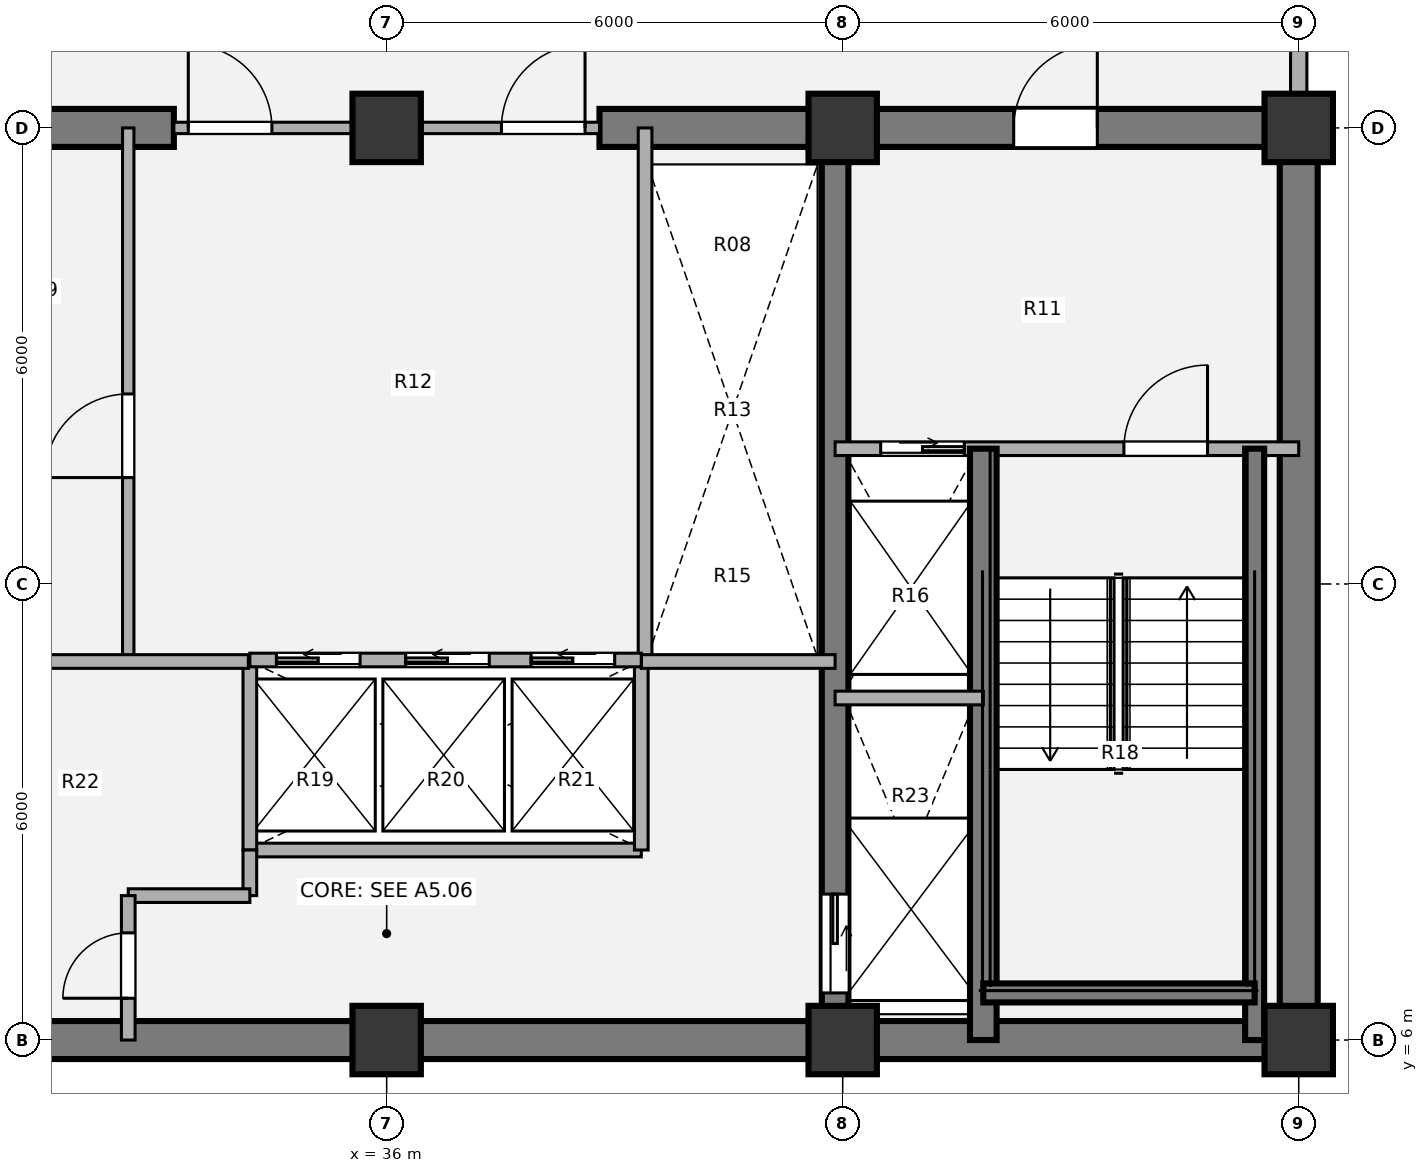
"""IFC4 building model, lengths in metres.
Left out: names, types, materials, properties, quantities, classifications, styles, units other than length and angle.
Written with IfcOpenShell. Run it as: python <this file> out.ifc"""

import sys

from ifc_helpers import new_model, si_unit, direction, frame, frame_2d, origin, origin_2d, place, context, subcontext, project, spatial, rectangle, extrude, source, transform, mapped, element, fill, save


model = new_model("IFC4")
c1 = context("Model", 3, precision=1e-05, world=origin(), true_north=direction((0.0, 1.0)))
c2 = subcontext(c1, "Body", "Model", "MODEL_VIEW")
j1 = project(units=[si_unit("LENGTHUNIT", "METRE"), si_unit("PLANEANGLEUNIT", "RADIAN")], contexts=[c1])
p1 = place(None, origin())
s1 = spatial("IfcSite", under=j1, at=p1, CompositionType="ELEMENT")
p2 = place(p1, origin())
s2 = spatial("IfcBuilding", under=s1, at=p2, CompositionType="ELEMENT")
p3 = place(p2, frame((0.0, 0.0, 123.84)))
s3 = spatial("IfcBuildingStorey", under=s2, at=p3, CompositionType="ELEMENT", Elevation=123.84)
m1 = source(origin(), c2, "Body", "SweptSolid", [
    extrude(rectangle(XDim=0.9, YDim=0.9, at=origin_2d()), origin(), (0.0, 0.0, 1.0), 3.78),
])
for number, where, z_axis, x_axis in (
    (1, (36.0, 6.0, 0.0), (0.0, 0.0, 1.0), (1.0, 0.0, 0.0)),
    (2, (42.0, 6.0, 0.0), (0.0, 0.0, 1.0), (1.0, 0.0, 0.0)),
    (3, (48.0, 6.0, 0.0), (0.0, 0.0, 1.0), (1.0, 0.0, 0.0)),
    (4, (36.0, 18.0, 0.0), (0.0, 0.0, 1.0), (1.0, 0.0, 0.0)),
    (5, (42.0, 18.0, 0.0), (0.0, 0.0, 1.0), (1.0, 0.0, 0.0)),
    (6, (48.0, 18.0, 0.0), (0.0, 0.0, 1.0), (1.0, 0.0, 0.0)),
):
    element("IfcColumn", number, at=place(p3, frame(where, z_axis=z_axis, x_axis=x_axis)), inside=s3, PredefinedType="COLUMN", context=c2, shape_type="MappedRepresentation", body=[
        mapped(m1, transform((0.0, 0.0, 0.0), x_axis=(1.0, 0.0, 0.0), y_axis=(0.0, 1.0, 0.0), z_axis=(0.0, 0.0, 1.0), scale=1.0)),
    ])
p4 = place(p3, frame((48.25, 6.0, 0.0), z_axis=(0.0, 0.0, 1.0), x_axis=(-1.0, 0.0, 0.0)))
e7 = element("IfcWall", 7, at=p4, inside=s3, PredefinedType="SHEAR", context=c2, shape_type="SweptSolid", body=[
    extrude(rectangle(XDim=24.5, YDim=0.5, at=frame_2d((12.25, 0.0))), origin(), (0.0, 0.0, 1.0), 3.78),
])
p5 = place(p3, frame((48.0, 18.0, 0.0), z_axis=(0.0, 0.0, 1.0), x_axis=(0.0, -1.0, 0.0)))
e8 = element("IfcWall", 8, at=p5, inside=s3, PredefinedType="SHEAR", context=c2, shape_type="SweptSolid", body=[
    extrude(rectangle(XDim=12.0, YDim=0.5, at=frame_2d((6.0, 0.0))), origin(), (0.0, 0.0, 1.0), 3.78),
])
p6 = place(p3, frame((23.75, 18.0, 0.0), z_axis=(0.0, 0.0, 1.0), x_axis=(1.0, 0.0, 0.0)))
e9 = element("IfcWall", 9, at=p6, inside=s3, PredefinedType="SHEAR", context=c2, shape_type="SweptSolid", body=[
    extrude(rectangle(XDim=9.45, YDim=0.5, at=frame_2d((4.725, 0.0))), origin(), (0.0, 0.0, 1.0), 3.78),
])
p7 = place(p6, frame((2.95, 0.0, 0.0)))
e10 = element("IfcOpeningElement", 10, at=p7, cuts=e9, PredefinedType="OPENING", context=c2, shape_type="SweptSolid", body=[
    extrude(rectangle(XDim=1.1, YDim=2.1, at=origin_2d()), frame((0.55, 0.26, 1.05), z_axis=(0.0, -1.0, 0.0), x_axis=(1.0, 0.0, 0.0)), (0.0, 0.0, 1.0), 0.52),
])
p8 = place(p3, frame((38.8, 18.0, 0.0), z_axis=(0.0, 0.0, 1.0), x_axis=(1.0, 0.0, 0.0)))
e11 = element("IfcWall", 11, at=p8, inside=s3, PredefinedType="SHEAR", context=c2, shape_type="SweptSolid", body=[
    extrude(rectangle(XDim=9.45, YDim=0.5, at=frame_2d((4.725, 0.0))), origin(), (0.0, 0.0, 1.0), 3.78),
])
p9 = place(p8, frame((5.45, 0.0, 0.0)))
e12 = element("IfcOpeningElement", 12, at=p9, cuts=e11, PredefinedType="OPENING", context=c2, shape_type="SweptSolid", body=[
    extrude(rectangle(XDim=1.1, YDim=2.1, at=origin_2d()), frame((0.55, 0.26, 1.05), z_axis=(0.0, -1.0, 0.0), x_axis=(1.0, 0.0, 0.0)), (0.0, 0.0, 1.0), 0.52),
])
p10 = place(p3, frame((41.9, 18.0, 0.0), z_axis=(0.0, 0.0, 1.0), x_axis=(0.0, -1.0, 0.0)))
e13 = element("IfcWall", 13, at=p10, inside=s3, PredefinedType="SHEAR", context=c2, shape_type="SweptSolid", body=[
    extrude(rectangle(XDim=12.0, YDim=0.35, at=frame_2d((6.0, 0.0))), origin(), (0.0, 0.0, 1.0), 3.78),
])
p11 = place(p10, frame((10.08, 0.0, 0.0)))
e14 = element("IfcOpeningElement", 14, at=p11, cuts=e13, PredefinedType="OPENING", context=c2, shape_type="SweptSolid", body=[
    extrude(rectangle(XDim=1.3, YDim=2.1, at=origin_2d()), frame((0.65, 0.185, 1.05), z_axis=(0.0, -1.0, 0.0), x_axis=(1.0, 0.0, 0.0)), (0.0, 0.0, 1.0), 0.37),
])
p12 = place(p3, frame((48.0, 21.05, 0.0), z_axis=(0.0, 0.0, 1.0), x_axis=(0.0, -1.0, 0.0)))
e15 = element("IfcWall", 15, at=p12, inside=s3, PredefinedType="SOLIDWALL", context=c2, shape_type="SweptSolid", body=[
    extrude(rectangle(XDim=2.62, YDim=0.215, at=frame_2d((1.31, 0.0))), origin(), (0.0, 0.0, 1.0), 3.53),
])
p13 = place(p3, frame((32.6, 11.0, 0.0), z_axis=(0.0, 0.0, 1.0), x_axis=(0.0, 1.0, 0.0)))
e16 = element("IfcWall", 16, at=p13, inside=s3, PredefinedType="PARTITIONING", context=c2, shape_type="SweptSolid", body=[
    extrude(rectangle(XDim=7.0, YDim=0.15, at=frame_2d((3.5, 0.0))), origin(), (0.0, 0.0, 1.0), 3.5),
])
p14 = place(p13, frame((2.4, 0.0, 0.0)))
e17 = element("IfcOpeningElement", 17, at=p14, cuts=e16, PredefinedType="OPENING", context=c2, shape_type="SweptSolid", body=[
    extrude(rectangle(XDim=1.1, YDim=2.1, at=origin_2d()), frame((0.55, 0.085, 1.05), z_axis=(0.0, -1.0, 0.0), x_axis=(1.0, 0.0, 0.0)), (0.0, 0.0, 1.0), 0.17),
])
p15 = place(p3, frame((34.2, 8.5, 0.0), z_axis=(0.0, 0.0, 1.0), x_axis=(1.0, 0.0, 0.0)))
e18 = element("IfcWall", 18, at=p15, inside=s3, PredefinedType="PARTITIONING", context=c2, shape_type="SweptSolid", body=[
    extrude(rectangle(XDim=5.15, YDim=0.18, at=frame_2d((2.575, 0.0))), origin(), (0.0, 0.0, 1.0), 3.5),
])
for number, where, z_axis, x_axis in (
    (19, (34.2, 8.5, 0.0), (0.0, 0.0, 1.0), (0.0, 1.0, 0.0)),
    (20, (39.35, 8.5, 0.0), (0.0, 0.0, 1.0), (0.0, 1.0, 0.0)),
):
    element("IfcWall", number, at=place(p3, frame(where, z_axis=z_axis, x_axis=x_axis)), inside=s3, PredefinedType="PARTITIONING", context=c2, shape_type="SweptSolid", body=[
        extrude(rectangle(XDim=2.5, YDim=0.18, at=frame_2d((1.25, 0.0))), origin(), (0.0, 0.0, 1.0), 3.5),
    ])
p16 = place(p3, frame((39.4, 11.0, 0.0), z_axis=(0.0, 0.0, 1.0), x_axis=(0.0, 1.0, 0.0)))
e21 = element("IfcWall", 21, at=p16, inside=s3, PredefinedType="PARTITIONING", context=c2, shape_type="SweptSolid", body=[
    extrude(rectangle(XDim=7.0, YDim=0.18, at=frame_2d((3.5, 0.0))), origin(), (0.0, 0.0, 1.0), 3.5),
])
p17 = place(p3, frame((30.1, 10.98, 0.0), z_axis=(0.0, 0.0, 1.0), x_axis=(1.0, 0.0, 0.0)))
e22 = element("IfcWall", 22, at=p17, inside=s3, PredefinedType="PARTITIONING", context=c2, shape_type="SweptSolid", body=[
    extrude(rectangle(XDim=4.08, YDim=0.18, at=frame_2d((2.04, 0.0))), origin(), (0.0, 0.0, 1.0), 3.5),
])
p18 = place(p3, frame((34.2, 7.9, 0.0), z_axis=(0.0, 0.0, 1.0), x_axis=(0.0, 1.0, 0.0)))
e23 = element("IfcWall", 23, at=p18, inside=s3, PredefinedType="PARTITIONING", context=c2, shape_type="SweptSolid", body=[
    extrude(rectangle(XDim=0.6, YDim=0.18, at=frame_2d((0.3, 0.0))), origin(), (0.0, 0.0, 1.0), 3.5),
])
p19 = place(p3, frame((32.6, 7.9, 0.0), z_axis=(0.0, 0.0, 1.0), x_axis=(1.0, 0.0, 0.0)))
e24 = element("IfcWall", 24, at=p19, inside=s3, PredefinedType="PARTITIONING", context=c2, shape_type="SweptSolid", body=[
    extrude(rectangle(XDim=1.6, YDim=0.18, at=frame_2d((0.8, 0.0))), origin(), (0.0, 0.0, 1.0), 3.5),
])
p20 = place(p3, frame((32.6, 6.0, 0.0), z_axis=(0.0, 0.0, 1.0), x_axis=(0.0, 1.0, 0.0)))
e25 = element("IfcWall", 25, at=p20, inside=s3, PredefinedType="PARTITIONING", context=c2, shape_type="SweptSolid", body=[
    extrude(rectangle(XDim=1.9, YDim=0.18, at=frame_2d((0.95, 0.0))), origin(), (0.0, 0.0, 1.0), 3.5),
])
p21 = place(p20, frame((0.55, 0.0, 0.0)))
e26 = element("IfcOpeningElement", 26, at=p21, cuts=e25, PredefinedType="OPENING", context=c2, shape_type="SweptSolid", body=[
    extrude(rectangle(XDim=0.86, YDim=2.1, at=origin_2d()), frame((0.43, 0.1, 1.05), z_axis=(0.0, -1.0, 0.0), x_axis=(1.0, 0.0, 0.0)), (0.0, 0.0, 1.0), 0.2),
])
p22 = place(p3, frame((39.35, 10.98, 0.0), z_axis=(0.0, 0.0, 1.0), x_axis=(1.0, 0.0, 0.0)))
e27 = element("IfcWall", 27, at=p22, inside=s3, PredefinedType="PARTITIONING", context=c2, shape_type="SweptSolid", body=[
    extrude(rectangle(XDim=2.55, YDim=0.18, at=frame_2d((1.275, 0.0))), origin(), (0.0, 0.0, 1.0), 3.5),
])
p23 = place(p3, frame((33.2, 18.0, 0.0), z_axis=(0.0, 0.0, 1.0), x_axis=(1.0, 0.0, 0.0)))
e28 = element("IfcWall", 28, at=p23, inside=s3, PredefinedType="PARTITIONING", context=c2, shape_type="SweptSolid", body=[
    extrude(rectangle(XDim=5.6, YDim=0.15, at=frame_2d((2.8, 0.0))), origin(), (0.0, 0.0, 1.0), 2.315),
])
p24 = place(p23, frame((0.19, 0.0, 0.0)))
e29 = element("IfcOpeningElement", 29, at=p24, cuts=e28, PredefinedType="OPENING", context=c2, shape_type="SweptSolid", body=[
    extrude(rectangle(XDim=1.1, YDim=2.1, at=origin_2d()), frame((0.55, 0.085, 1.05), z_axis=(0.0, -1.0, 0.0), x_axis=(1.0, 0.0, 0.0)), (0.0, 0.0, 1.0), 0.17),
])
p25 = place(p23, frame((4.31, 0.0, 0.0)))
e30 = element("IfcOpeningElement", 30, at=p25, cuts=e28, PredefinedType="OPENING", context=c2, shape_type="SweptSolid", body=[
    extrude(rectangle(XDim=1.1, YDim=2.1, at=origin_2d()), frame((0.55, 0.085, 1.05), z_axis=(0.0, -1.0, 0.0), x_axis=(1.0, 0.0, 0.0)), (0.0, 0.0, 1.0), 0.17),
])
p26 = place(p3, frame((41.9, 13.78, 0.0), z_axis=(0.0, 0.0, 1.0), x_axis=(1.0, 0.0, 0.0)))
e31 = element("IfcWall", 31, at=p26, inside=s3, PredefinedType="PARTITIONING", context=c2, shape_type="SweptSolid", body=[
    extrude(rectangle(XDim=6.1, YDim=0.18, at=frame_2d((3.05, 0.0))), origin(), (0.0, 0.0, 1.0), 3.5),
])
p27 = place(p26, frame((0.6, 0.0, 0.0)))
e32 = element("IfcOpeningElement", 32, at=p27, cuts=e31, PredefinedType="OPENING", context=c2, shape_type="SweptSolid", body=[
    extrude(rectangle(XDim=1.1, YDim=2.1, at=origin_2d()), frame((0.55, 0.1, 1.05), z_axis=(0.0, -1.0, 0.0), x_axis=(1.0, 0.0, 0.0)), (0.0, 0.0, 1.0), 0.2),
])
p28 = place(p26, frame((3.8, 0.0, 0.0)))
e33 = element("IfcOpeningElement", 33, at=p28, cuts=e31, PredefinedType="OPENING", context=c2, shape_type="SweptSolid", body=[
    extrude(rectangle(XDim=1.1, YDim=2.1, at=origin_2d()), frame((0.55, 0.1, 1.05), z_axis=(0.0, -1.0, 0.0), x_axis=(1.0, 0.0, 0.0)), (0.0, 0.0, 1.0), 0.2),
])
p29 = place(p3, frame((43.85, 6.0, 0.0), z_axis=(0.0, 0.0, 1.0), x_axis=(0.0, 1.0, 0.0)))
e34 = element("IfcWall", 34, at=p29, inside=s3, PredefinedType="SHEAR", context=c2, shape_type="SweptSolid", body=[
    extrude(rectangle(XDim=7.78, YDim=0.35, at=frame_2d((3.89, 0.0))), origin(), (0.0, 0.0, 1.0), 3.85),
])
p30 = place(p3, frame((47.42, 6.0, 0.0), z_axis=(0.0, 0.0, 1.0), x_axis=(0.0, 1.0, 0.0)))
e35 = element("IfcWall", 35, at=p30, inside=s3, PredefinedType="SHEAR", context=c2, shape_type="SweptSolid", body=[
    extrude(rectangle(XDim=7.78, YDim=0.25, at=frame_2d((3.89, 0.0))), origin(), (0.0, 0.0, 1.0), 3.85),
])
p31 = place(p3, frame((43.85, 6.62, 0.0), z_axis=(0.0, 0.0, 1.0), x_axis=(1.0, 0.0, 0.0)))
e36 = element("IfcWall", 36, at=p31, inside=s3, PredefinedType="SHEAR", context=c2, shape_type="SweptSolid", body=[
    extrude(rectangle(XDim=3.57, YDim=0.25, at=frame_2d((1.785, 0.0))), origin(), (0.0, 0.0, 1.0), 3.85),
])
p32 = place(p3, frame((41.9, 10.5, 0.0), z_axis=(0.0, 0.0, 1.0), x_axis=(1.0, 0.0, 0.0)))
e37 = element("IfcWall", 37, at=p32, inside=s3, PredefinedType="PARTITIONING", context=c2, shape_type="SweptSolid", body=[
    extrude(rectangle(XDim=1.95, YDim=0.18, at=frame_2d((0.975, 0.0))), origin(), (0.0, 0.0, 1.0), 3.5),
])
p33 = place(p3, frame((34.2, 11.0, 0.0), z_axis=(0.0, 0.0, 1.0), x_axis=(1.0, 0.0, 0.0)))
e38 = element("IfcWall", 38, at=p33, inside=s3, PredefinedType="PARTITIONING", context=c2, shape_type="SweptSolid", body=[
    extrude(rectangle(XDim=5.15, YDim=0.18, at=frame_2d((2.575, 0.0))), origin(), (0.0, 0.0, 1.0), 3.5),
])
p34 = place(p33, frame((0.35, 0.0, 0.0)))
e39 = element("IfcOpeningElement", 39, at=p34, cuts=e38, PredefinedType="OPENING", context=c2, shape_type="SweptSolid", body=[
    extrude(rectangle(XDim=1.1, YDim=2.1, at=origin_2d()), frame((0.55, 0.1, 1.05), z_axis=(0.0, -1.0, 0.0), x_axis=(1.0, 0.0, 0.0)), (0.0, 0.0, 1.0), 0.2),
])
p35 = place(p33, frame((2.05, 0.0, 0.0)))
e40 = element("IfcOpeningElement", 40, at=p35, cuts=e38, PredefinedType="OPENING", context=c2, shape_type="SweptSolid", body=[
    extrude(rectangle(XDim=1.1, YDim=2.1, at=origin_2d()), frame((0.55, 0.1, 1.05), z_axis=(0.0, -1.0, 0.0), x_axis=(1.0, 0.0, 0.0)), (0.0, 0.0, 1.0), 0.2),
])
p36 = place(p33, frame((3.7, 0.0, 0.0)))
e41 = element("IfcOpeningElement", 41, at=p36, cuts=e38, PredefinedType="OPENING", context=c2, shape_type="SweptSolid", body=[
    extrude(rectangle(XDim=1.1, YDim=2.1, at=origin_2d()), frame((0.55, 0.1, 1.05), z_axis=(0.0, -1.0, 0.0), x_axis=(1.0, 0.0, 0.0)), (0.0, 0.0, 1.0), 0.2),
])
m2 = source(origin(), c2, "Body", "SweptSolid", [
    extrude(rectangle(XDim=1.1, YDim=2.1, at=origin_2d()), frame((0.55, 0.025, 1.05), z_axis=(0.0, -1.0, 0.0), x_axis=(1.0, 0.0, 0.0)), (0.0, 0.0, 1.0), 0.05),
])
p37 = place(p14, origin())
e42 = element("IfcDoor", 42, at=p37, inside=s3, OperationType="SINGLE_SWING_LEFT", PredefinedType="DOOR", context=c2, shape_type="MappedRepresentation", body=[
    mapped(m2, transform((0.0, 0.0, 0.0), x_axis=(1.0, 0.0, 0.0), y_axis=(0.0, 1.0, 0.0), z_axis=(0.0, 0.0, 1.0), scale=1.0)),
])
fill(e17, e42)
m3 = source(origin(), c2, "Body", "SweptSolid", [
    extrude(rectangle(XDim=0.86, YDim=2.1, at=origin_2d()), frame((0.43, 0.025, 1.05), z_axis=(0.0, -1.0, 0.0), x_axis=(1.0, 0.0, 0.0)), (0.0, 0.0, 1.0), 0.05),
])
p38 = place(p21, origin())
e43 = element("IfcDoor", 43, at=p38, inside=s3, OperationType="SINGLE_SWING_LEFT", PredefinedType="DOOR", context=c2, shape_type="MappedRepresentation", body=[
    mapped(m3, transform((0.0, 0.0, 0.0), x_axis=(1.0, 0.0, 0.0), y_axis=(0.0, 1.0, 0.0), z_axis=(0.0, 0.0, 1.0), scale=1.0)),
])
fill(e26, e43)
m4 = source(origin(), c2, "Body", "SweptSolid", [
    extrude(rectangle(XDim=1.1, YDim=2.1, at=origin_2d()), frame((0.55, 0.025, 1.05), z_axis=(0.0, -1.0, 0.0), x_axis=(1.0, 0.0, 0.0)), (0.0, 0.0, 1.0), 0.05),
])
p39 = place(p24, origin())
e44 = element("IfcDoor", 44, at=p39, inside=s3, OperationType="SINGLE_SWING_LEFT", PredefinedType="DOOR", context=c2, shape_type="MappedRepresentation", body=[
    mapped(m4, transform((0.0, 0.0, 0.0), x_axis=(1.0, 0.0, 0.0), y_axis=(0.0, 1.0, 0.0), z_axis=(0.0, 0.0, 1.0), scale=1.0)),
])
fill(e29, e44)
p40 = place(p25, origin())
e45 = element("IfcDoor", 45, at=p40, inside=s3, OperationType="SINGLE_SWING_RIGHT", PredefinedType="DOOR", context=c2, shape_type="MappedRepresentation", body=[
    mapped(m4, transform((0.0, 0.0, 0.0), x_axis=(1.0, 0.0, 0.0), y_axis=(0.0, 1.0, 0.0), z_axis=(0.0, 0.0, 1.0), scale=1.0)),
])
fill(e30, e45)
m5 = source(origin(), c2, "Body", "SweptSolid", [
    extrude(rectangle(XDim=1.1, YDim=2.1, at=origin_2d()), frame((0.55, 0.025, 1.05), z_axis=(0.0, -1.0, 0.0), x_axis=(1.0, 0.0, 0.0)), (0.0, 0.0, 1.0), 0.05),
])
p41 = place(p27, origin())
e46 = element("IfcDoor", 46, at=p41, inside=s3, OperationType="SLIDING_TO_RIGHT", PredefinedType="DOOR", context=c2, shape_type="MappedRepresentation", body=[
    mapped(m5, transform((0.0, 0.0, 0.0), x_axis=(1.0, 0.0, 0.0), y_axis=(0.0, 1.0, 0.0), z_axis=(0.0, 0.0, 1.0), scale=1.0)),
])
fill(e32, e46)
m6 = source(origin(), c2, "Body", "SweptSolid", [
    extrude(rectangle(XDim=1.1, YDim=2.1, at=origin_2d()), frame((0.55, 0.025, 1.05), z_axis=(0.0, -1.0, 0.0), x_axis=(1.0, 0.0, 0.0)), (0.0, 0.0, 1.0), 0.05),
])
p42 = place(p28, origin())
e47 = element("IfcDoor", 47, at=p42, inside=s3, OperationType="SINGLE_SWING_RIGHT", PredefinedType="DOOR", context=c2, shape_type="MappedRepresentation", body=[
    mapped(m6, transform((0.0, 0.0, 0.0), x_axis=(1.0, 0.0, 0.0), y_axis=(0.0, 1.0, 0.0), z_axis=(0.0, 0.0, 1.0), scale=1.0)),
])
fill(e33, e47)
m7 = source(origin(), c2, "Body", "SweptSolid", [
    extrude(rectangle(XDim=1.3, YDim=2.1, at=origin_2d()), frame((0.65, 0.025, 1.05), z_axis=(0.0, -1.0, 0.0), x_axis=(1.0, 0.0, 0.0)), (0.0, 0.0, 1.0), 0.05),
])
p43 = place(p11, origin())
e48 = element("IfcDoor", 48, at=p43, inside=s3, OperationType="SLIDING_TO_LEFT", PredefinedType="DOOR", context=c2, shape_type="MappedRepresentation", body=[
    mapped(m7, transform((0.0, 0.0, 0.0), x_axis=(1.0, 0.0, 0.0), y_axis=(0.0, 1.0, 0.0), z_axis=(0.0, 0.0, 1.0), scale=1.0)),
])
fill(e14, e48)
p44 = place(p9, origin())
e49 = element("IfcDoor", 49, at=p44, inside=s3, OperationType="SINGLE_SWING_RIGHT", PredefinedType="DOOR", context=c2, shape_type="MappedRepresentation", body=[
    mapped(m4, transform((0.0, 0.0, 0.0), x_axis=(1.0, 0.0, 0.0), y_axis=(0.0, 1.0, 0.0), z_axis=(0.0, 0.0, 1.0), scale=1.0)),
])
fill(e12, e49)
p45 = place(p34, origin())
e50 = element("IfcDoor", 50, at=p45, inside=s3, OperationType="SLIDING_TO_LEFT", PredefinedType="DOOR", context=c2, shape_type="MappedRepresentation", body=[
    mapped(m5, transform((0.0, 0.0, 0.0), x_axis=(1.0, 0.0, 0.0), y_axis=(0.0, 1.0, 0.0), z_axis=(0.0, 0.0, 1.0), scale=1.0)),
])
fill(e39, e50)
p46 = place(p35, origin())
e51 = element("IfcDoor", 51, at=p46, inside=s3, OperationType="SLIDING_TO_LEFT", PredefinedType="DOOR", context=c2, shape_type="MappedRepresentation", body=[
    mapped(m5, transform((0.0, 0.0, 0.0), x_axis=(1.0, 0.0, 0.0), y_axis=(0.0, 1.0, 0.0), z_axis=(0.0, 0.0, 1.0), scale=1.0)),
])
fill(e40, e51)
p47 = place(p36, origin())
e52 = element("IfcDoor", 52, at=p47, inside=s3, OperationType="SLIDING_TO_LEFT", PredefinedType="DOOR", context=c2, shape_type="MappedRepresentation", body=[
    mapped(m5, transform((0.0, 0.0, 0.0), x_axis=(1.0, 0.0, 0.0), y_axis=(0.0, 1.0, 0.0), z_axis=(0.0, 0.0, 1.0), scale=1.0)),
])
fill(e41, e52)
save(model, sys.argv[1])
